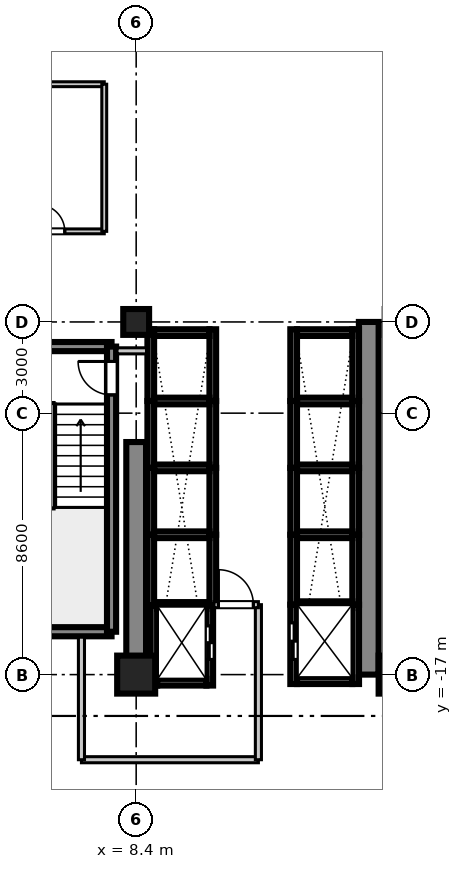
"""IFC4 building model, lengths in metres.
Left out: names, types, materials, properties, quantities, classifications, styles, units other than length and angle.
Written with IfcOpenShell. Run it as: python <this file> out.ifc"""

import sys

from ifc_helpers import new_model, si_unit, direction, frame, frame_2d, origin, origin_2d, place, context, subcontext, project, spatial, rectangle, extrude, source, transform, mapped, element, fill, save


model = new_model("IFC4")
c1 = context("Model", 3, precision=1e-05, world=origin(), true_north=direction((0.0, 1.0)))
c2 = subcontext(c1, "Body", "Model", "MODEL_VIEW")
j1 = project(units=[si_unit("LENGTHUNIT", "METRE"), si_unit("PLANEANGLEUNIT", "RADIAN")], contexts=[c1])
p1 = place(None, origin())
s1 = spatial("IfcSite", under=j1, at=p1, CompositionType="ELEMENT")
p2 = place(p1, origin())
s2 = spatial("IfcBuilding", under=s1, at=p2, CompositionType="ELEMENT")
p3 = place(p2, frame((0.0, 0.0, 132.1)))
s3 = spatial("IfcBuildingStorey", under=s2, at=p3, CompositionType="ELEMENT", Elevation=132.1)
m1 = source(origin(), c2, "Body", "SweptSolid", [
    extrude(rectangle(XDim=1.25, YDim=1.25, at=origin_2d()), origin(), (0.0, 0.0, 1.0), 3.605),
])
p4 = place(p3, frame((8.4, -17.0, 0.0), z_axis=(0.0, 0.0, 1.0), x_axis=(1.0, 0.0, 0.0)))
e1 = element("IfcColumn", 1, at=p4, inside=s3, PredefinedType="COLUMN", context=c2, shape_type="MappedRepresentation", body=[
    mapped(m1, transform((0.0, 0.0, 0.0), scale=1.0)),
])
m2 = source(origin(), c2, "Body", "SweptSolid", [
    extrude(rectangle(XDim=0.85, YDim=0.85, at=origin_2d()), origin(), (0.0, 0.0, 1.0), 3.605),
])
p5 = place(p3, frame((8.4, -5.4, 0.0), z_axis=(0.0, 0.0, 1.0), x_axis=(1.0, 0.0, 0.0)))
e2 = element("IfcColumn", 2, at=p5, inside=s3, PredefinedType="PILASTER", context=c2, shape_type="MappedRepresentation", body=[
    mapped(m2, transform((0.0, 0.0, 0.0), scale=1.0)),
])
p6 = place(p3, frame((17.0, -17.0, 0.0), z_axis=(0.0, 0.0, 1.0), x_axis=(1.0, 0.0, 0.0)))
e3 = element("IfcColumn", 3, at=p6, inside=s3, PredefinedType="COLUMN", context=c2, shape_type="MappedRepresentation", body=[
    mapped(m1, transform((0.0, 0.0, 0.0), scale=1.0)),
])
m3 = source(origin(), c2, "Body", "SweptSolid", [
    extrude(rectangle(XDim=7.65, YDim=0.65, at=frame_2d((3.825, 0.0))), origin(), (0.0, 0.0, 1.0), 3.38),
])
p7 = place(p3, frame((8.4, -17.0, 0.0), z_axis=(0.0, 0.0, 1.0), x_axis=(0.0, 1.0, 0.0)))
e4 = element("IfcWall", 4, at=p7, inside=s3, PredefinedType="SHEAR", context=c2, shape_type="MappedRepresentation", body=[
    mapped(m3, transform((0.0, 0.0, 0.0), scale=1.0)),
])
m4 = source(origin(), c2, "Body", "SweptSolid", [
    extrude(rectangle(XDim=11.6, YDim=0.65, at=frame_2d((5.8, 0.0))), origin(), (0.0, 0.0, 1.0), 3.38),
])
p8 = place(p3, frame((16.05, -17.0, 0.0), z_axis=(0.0, 0.0, 1.0), x_axis=(0.0, 1.0, 0.0)))
e5 = element("IfcWall", 5, at=p8, inside=s3, PredefinedType="SHEAR", context=c2, shape_type="MappedRepresentation", body=[
    mapped(m4, transform((0.0, 0.0, 0.0), scale=1.0)),
])
m5 = source(origin(), c2, "Body", "SweptSolid", [
    extrude(rectangle(XDim=3.98, YDim=0.3, at=frame_2d((1.99, 0.0))), origin(), (0.0, 0.0, 1.0), 3.38),
])
for number, where, z_axis, x_axis in (
    (6, (3.61, -15.59, 0.0), (0.0, 0.0, 1.0), (1.0, 0.0, 0.0)),
    (7, (3.61, -6.21, 0.0), (0.0, 0.0, 1.0), (1.0, 0.0, 0.0)),
):
    element("IfcWall", number, at=place(p3, frame(where, z_axis=z_axis, x_axis=x_axis)), inside=s3, PredefinedType="SHEAR", context=c2, shape_type="MappedRepresentation", body=[
        mapped(m5, transform((0.0, 0.0, 0.0), scale=1.0)),
    ])
m6 = source(origin(), c2, "Body", "SweptSolid", [
    extrude(rectangle(XDim=9.38, YDim=0.3, at=frame_2d((4.69, 0.0))), origin(), (0.0, 0.0, 1.0), 3.38),
])
p9 = place(p3, frame((7.59, -15.59, 0.0), z_axis=(0.0, 0.0, 1.0), x_axis=(0.0, 1.0, 0.0)))
e8 = element("IfcWall", 8, at=p9, inside=s3, PredefinedType="SHEAR", context=c2, shape_type="MappedRepresentation", body=[
    mapped(m6, transform((0.0, 0.0, 0.0), scale=1.0)),
])
p10 = place(p9, frame((7.79, 0.0, 0.0)))
e9 = element("IfcOpeningElement", 9, at=p10, cuts=e8, PredefinedType="OPENING", context=c2, shape_type="SweptSolid", body=[
    extrude(rectangle(XDim=1.1, YDim=2.15, at=frame_2d((0.55, 1.075))), frame((0.0, 0.16, 0.0), z_axis=(0.0, -1.0, 0.0), x_axis=(1.0, 0.0, 0.0)), (0.0, 0.0, 1.0), 0.32),
])
m7 = source(origin(), c2, "Body", "SweptSolid", [
    extrude(rectangle(XDim=2.36, YDim=0.22, at=frame_2d((1.18, 0.0))), origin(), (0.0, 0.0, 1.0), 3.38),
])
for number, where, z_axis, x_axis in (
    (10, (13.58, -8.0, 0.0), (0.0, 0.0, 1.0), (0.0, 1.0, 0.0)),
    (11, (15.62, -8.0, 0.0), (0.0, 0.0, 1.0), (0.0, 1.0, 0.0)),
):
    element("IfcWall", number, at=place(p3, frame(where, z_axis=z_axis, x_axis=x_axis)), inside=s3, PredefinedType="SHEAR", context=c2, shape_type="MappedRepresentation", body=[
        mapped(m7, transform((0.0, 0.0, 0.0), scale=1.0)),
    ])
m8 = source(origin(), c2, "Body", "SweptSolid", [
    extrude(rectangle(XDim=1.82, YDim=0.22, at=frame_2d((0.91, 0.0))), origin(), (0.0, 0.0, 1.0), 3.38),
])
p11 = place(p3, frame((13.69, -5.75, 0.0), z_axis=(0.0, 0.0, 1.0), x_axis=(1.0, 0.0, 0.0)))
e12 = element("IfcWall", 12, at=p11, inside=s3, PredefinedType="SHEAR", context=c2, shape_type="MappedRepresentation", body=[
    mapped(m8, transform((0.0, 0.0, 0.0), scale=1.0)),
])
m9 = source(origin(), c2, "Body", "SweptSolid", [
    extrude(rectangle(XDim=2.2, YDim=0.22, at=frame_2d((1.1, 0.0))), origin(), (0.0, 0.0, 1.0), 3.38),
])
for number, where, z_axis, x_axis in (
    (13, (13.58, -10.2, 0.0), (0.0, 0.0, 1.0), (0.0, 1.0, 0.0)),
    (14, (15.62, -10.2, 0.0), (0.0, 0.0, 1.0), (0.0, 1.0, 0.0)),
):
    element("IfcWall", number, at=place(p3, frame(where, z_axis=z_axis, x_axis=x_axis)), inside=s3, PredefinedType="SHEAR", context=c2, shape_type="MappedRepresentation", body=[
        mapped(m9, transform((0.0, 0.0, 0.0), scale=1.0)),
    ])
m10 = source(origin(), c2, "Body", "SweptSolid", [
    extrude(rectangle(XDim=1.82, YDim=0.22, at=frame_2d((0.91, 0.0))), origin(), (0.0, 0.0, 1.0), 3.65),
])
p12 = place(p3, frame((13.69, -8.0, 0.0), z_axis=(0.0, 0.0, 1.0), x_axis=(1.0, 0.0, 0.0)))
e15 = element("IfcWall", 15, at=p12, inside=s3, PredefinedType="SHEAR", context=c2, shape_type="MappedRepresentation", body=[
    mapped(m10, transform((0.0, 0.0, 0.0), scale=1.0)),
])
for number, where, z_axis, x_axis in (
    (16, (13.58, -12.4, 0.0), (0.0, 0.0, 1.0), (0.0, 1.0, 0.0)),
    (17, (15.62, -12.4, 0.0), (0.0, 0.0, 1.0), (0.0, 1.0, 0.0)),
):
    element("IfcWall", number, at=place(p3, frame(where, z_axis=z_axis, x_axis=x_axis)), inside=s3, PredefinedType="SHEAR", context=c2, shape_type="MappedRepresentation", body=[
        mapped(m9, transform((0.0, 0.0, 0.0), scale=1.0)),
    ])
p13 = place(p3, frame((13.69, -10.2, 0.0), z_axis=(0.0, 0.0, 1.0), x_axis=(1.0, 0.0, 0.0)))
e18 = element("IfcWall", 18, at=p13, inside=s3, PredefinedType="SHEAR", context=c2, shape_type="MappedRepresentation", body=[
    mapped(m10, transform((0.0, 0.0, 0.0), scale=1.0)),
])
m11 = source(origin(), c2, "Body", "SweptSolid", [
    extrude(rectangle(XDim=2.3, YDim=0.22, at=frame_2d((1.15, 0.0))), origin(), (0.0, 0.0, 1.0), 3.38),
])
for number, where, z_axis, x_axis in (
    (19, (13.58, -14.7, 0.0), (0.0, 0.0, 1.0), (0.0, 1.0, 0.0)),
    (20, (15.62, -14.7, 0.0), (0.0, 0.0, 1.0), (0.0, 1.0, 0.0)),
):
    element("IfcWall", number, at=place(p3, frame(where, z_axis=z_axis, x_axis=x_axis)), inside=s3, PredefinedType="SHEAR", context=c2, shape_type="MappedRepresentation", body=[
        mapped(m11, transform((0.0, 0.0, 0.0), scale=1.0)),
    ])
p14 = place(p3, frame((13.69, -12.4, 0.0), z_axis=(0.0, 0.0, 1.0), x_axis=(1.0, 0.0, 0.0)))
e21 = element("IfcWall", 21, at=p14, inside=s3, PredefinedType="SHEAR", context=c2, shape_type="MappedRepresentation", body=[
    mapped(m10, transform((0.0, 0.0, 0.0), scale=1.0)),
])
for number, where, z_axis, x_axis in (
    (22, (8.88, -8.0, 0.0), (0.0, 0.0, 1.0), (0.0, 1.0, 0.0)),
    (23, (10.92, -8.0, 0.0), (0.0, 0.0, 1.0), (0.0, 1.0, 0.0)),
):
    element("IfcWall", number, at=place(p3, frame(where, z_axis=z_axis, x_axis=x_axis)), inside=s3, PredefinedType="SHEAR", context=c2, shape_type="MappedRepresentation", body=[
        mapped(m7, transform((0.0, 0.0, 0.0), scale=1.0)),
    ])
p15 = place(p3, frame((8.99, -5.75, 0.0), z_axis=(0.0, 0.0, 1.0), x_axis=(1.0, 0.0, 0.0)))
e24 = element("IfcWall", 24, at=p15, inside=s3, PredefinedType="SHEAR", context=c2, shape_type="MappedRepresentation", body=[
    mapped(m8, transform((0.0, 0.0, 0.0), scale=1.0)),
])
for number, where, z_axis, x_axis in (
    (25, (8.88, -10.2, 0.0), (0.0, 0.0, 1.0), (0.0, 1.0, 0.0)),
    (26, (10.92, -10.2, 0.0), (0.0, 0.0, 1.0), (0.0, 1.0, 0.0)),
):
    element("IfcWall", number, at=place(p3, frame(where, z_axis=z_axis, x_axis=x_axis)), inside=s3, PredefinedType="SHEAR", context=c2, shape_type="MappedRepresentation", body=[
        mapped(m9, transform((0.0, 0.0, 0.0), scale=1.0)),
    ])
p16 = place(p3, frame((8.99, -8.0, 0.0), z_axis=(0.0, 0.0, 1.0), x_axis=(1.0, 0.0, 0.0)))
e27 = element("IfcWall", 27, at=p16, inside=s3, PredefinedType="SHEAR", context=c2, shape_type="MappedRepresentation", body=[
    mapped(m10, transform((0.0, 0.0, 0.0), scale=1.0)),
])
for number, where, z_axis, x_axis in (
    (28, (8.88, -12.4, 0.0), (0.0, 0.0, 1.0), (0.0, 1.0, 0.0)),
    (29, (10.92, -12.4, 0.0), (0.0, 0.0, 1.0), (0.0, 1.0, 0.0)),
):
    element("IfcWall", number, at=place(p3, frame(where, z_axis=z_axis, x_axis=x_axis)), inside=s3, PredefinedType="SHEAR", context=c2, shape_type="MappedRepresentation", body=[
        mapped(m9, transform((0.0, 0.0, 0.0), scale=1.0)),
    ])
p17 = place(p3, frame((8.99, -10.2, 0.0), z_axis=(0.0, 0.0, 1.0), x_axis=(1.0, 0.0, 0.0)))
e30 = element("IfcWall", 30, at=p17, inside=s3, PredefinedType="SHEAR", context=c2, shape_type="MappedRepresentation", body=[
    mapped(m10, transform((0.0, 0.0, 0.0), scale=1.0)),
])
m12 = source(origin(), c2, "Body", "SweptSolid", [
    extrude(rectangle(XDim=2.325, YDim=0.22, at=frame_2d((1.163, 0.0))), origin(), (0.0, 0.0, 1.0), 3.38),
])
for number, where, z_axis, x_axis in (
    (31, (8.88, -14.725, 0.0), (0.0, 0.0, 1.0), (0.0, 1.0, 0.0)),
    (32, (10.92, -14.725, 0.0), (0.0, 0.0, 1.0), (0.0, 1.0, 0.0)),
):
    element("IfcWall", number, at=place(p3, frame(where, z_axis=z_axis, x_axis=x_axis)), inside=s3, PredefinedType="SHEAR", context=c2, shape_type="MappedRepresentation", body=[
        mapped(m12, transform((0.0, 0.0, 0.0), scale=1.0)),
    ])
p18 = place(p3, frame((8.99, -12.4, 0.0), z_axis=(0.0, 0.0, 1.0), x_axis=(1.0, 0.0, 0.0)))
e33 = element("IfcWall", 33, at=p18, inside=s3, PredefinedType="SHEAR", context=c2, shape_type="MappedRepresentation", body=[
    mapped(m10, transform((0.0, 0.0, 0.0), scale=1.0)),
])
m13 = source(origin(), c2, "Body", "SweptSolid", [
    extrude(rectangle(XDim=2.635, YDim=0.22, at=frame_2d((1.317, 0.0))), origin(), (0.0, 0.0, 1.0), 3.38),
])
p19 = place(p3, frame((8.98, -17.36, 0.0), z_axis=(0.0, 0.0, 1.0), x_axis=(0.0, 1.0, 0.0)))
e34 = element("IfcWall", 34, at=p19, inside=s3, PredefinedType="SHEAR", context=c2, shape_type="MappedRepresentation", body=[
    mapped(m13, transform((0.0, 0.0, 0.0), scale=1.0)),
])
p20 = place(p3, frame((10.82, -17.36, 0.0), z_axis=(0.0, 0.0, 1.0), x_axis=(0.0, 1.0, 0.0)))
e35 = element("IfcWall", 35, at=p20, inside=s3, PredefinedType="SHEAR", context=c2, shape_type="MappedRepresentation", body=[
    mapped(m13, transform((0.0, 0.0, 0.0), scale=1.0)),
])
p21 = place(p20, frame((0.86, 0.0, 0.0)))
e36 = element("IfcOpeningElement", 36, at=p21, cuts=e35, PredefinedType="OPENING", context=c2, shape_type="SweptSolid", body=[
    extrude(rectangle(XDim=1.1, YDim=2.2, at=frame_2d((0.55, 1.1))), frame((0.0, 0.12, 0.0), z_axis=(0.0, -1.0, 0.0), x_axis=(1.0, 0.0, 0.0)), (0.0, 0.0, 1.0), 0.24),
])
m14 = source(origin(), c2, "Body", "SweptSolid", [
    extrude(rectangle(XDim=1.62, YDim=0.22, at=frame_2d((0.81, 0.0))), origin(), (0.0, 0.0, 1.0), 3.38),
])
p22 = place(p3, frame((9.09, -17.25, 0.0), z_axis=(0.0, 0.0, 1.0), x_axis=(1.0, 0.0, 0.0)))
e37 = element("IfcWall", 37, at=p22, inside=s3, PredefinedType="SHEAR", context=c2, shape_type="MappedRepresentation", body=[
    mapped(m14, transform((0.0, 0.0, 0.0), scale=1.0)),
])
m15 = source(origin(), c2, "Body", "SweptSolid", [
    extrude(rectangle(XDim=1.62, YDim=0.22, at=frame_2d((0.81, 0.0))), origin(), (0.0, 0.0, 1.0), 3.65),
])
p23 = place(p3, frame((9.09, -14.725, 0.0), z_axis=(0.0, 0.0, 1.0), x_axis=(1.0, 0.0, 0.0)))
e38 = element("IfcWall", 38, at=p23, inside=s3, PredefinedType="SHEAR", context=c2, shape_type="MappedRepresentation", body=[
    mapped(m15, transform((0.0, 0.0, 0.0), scale=1.0)),
])
m16 = source(origin(), c2, "Body", "SweptSolid", [
    extrude(rectangle(XDim=2.61, YDim=0.22, at=frame_2d((1.305, 0.0))), origin(), (0.0, 0.0, 1.0), 3.38),
])
p24 = place(p3, frame((13.58, -17.31, 0.0), z_axis=(0.0, 0.0, 1.0), x_axis=(0.0, 1.0, 0.0)))
e39 = element("IfcWall", 39, at=p24, inside=s3, PredefinedType="SHEAR", context=c2, shape_type="MappedRepresentation", body=[
    mapped(m16, transform((0.0, 0.0, 0.0), scale=1.0)),
])
p25 = place(p24, frame((0.81, 0.0, 0.0)))
e40 = element("IfcOpeningElement", 40, at=p25, cuts=e39, PredefinedType="OPENING", context=c2, shape_type="SweptSolid", body=[
    extrude(rectangle(XDim=1.2, YDim=2.2, at=frame_2d((0.6, 1.1))), frame((0.0, 0.12, 0.0), z_axis=(0.0, -1.0, 0.0), x_axis=(1.0, 0.0, 0.0)), (0.0, 0.0, 1.0), 0.24),
])
p26 = place(p3, frame((15.62, -17.31, 0.0), z_axis=(0.0, 0.0, 1.0), x_axis=(0.0, 1.0, 0.0)))
e41 = element("IfcWall", 41, at=p26, inside=s3, PredefinedType="SHEAR", context=c2, shape_type="MappedRepresentation", body=[
    mapped(m16, transform((0.0, 0.0, 0.0), scale=1.0)),
])
p27 = place(p3, frame((13.69, -17.2, 0.0), z_axis=(0.0, 0.0, 1.0), x_axis=(1.0, 0.0, 0.0)))
e42 = element("IfcWall", 42, at=p27, inside=s3, PredefinedType="SHEAR", context=c2, shape_type="MappedRepresentation", body=[
    mapped(m8, transform((0.0, 0.0, 0.0), scale=1.0)),
])
p28 = place(p3, frame((13.69, -14.7, 0.0), z_axis=(0.0, 0.0, 1.0), x_axis=(1.0, 0.0, 0.0)))
e43 = element("IfcWall", 43, at=p28, inside=s3, PredefinedType="SHEAR", context=c2, shape_type="MappedRepresentation", body=[
    mapped(m10, transform((0.0, 0.0, 0.0), scale=1.0)),
])
m17 = source(origin(), c2, "Body", "SweptSolid", [
    extrude(rectangle(XDim=5.82, YDim=0.2, at=frame_2d((2.91, 0.0))), origin(), (0.0, 0.0, 1.0), 2.72),
])
p29 = place(p3, frame((6.6, -19.8, 0.0), z_axis=(0.0, 0.0, 1.0), x_axis=(1.0, 0.0, 0.0)))
e44 = element("IfcWall", 44, at=p29, inside=s3, PredefinedType="PARTITIONING", context=c2, shape_type="MappedRepresentation", body=[
    mapped(m17, transform((0.0, 0.0, 0.0), scale=1.0)),
])
m18 = source(origin(), c2, "Body", "SweptSolid", [
    extrude(rectangle(XDim=4.03, YDim=0.2, at=frame_2d((2.015, 0.0))), origin(), (0.0, 0.0, 1.0), 2.72),
])
p30 = place(p3, frame((6.6, -19.8, 0.0), z_axis=(0.0, 0.0, 1.0), x_axis=(0.0, 1.0, 0.0)))
e45 = element("IfcWall", 45, at=p30, inside=s3, PredefinedType="PARTITIONING", context=c2, shape_type="MappedRepresentation", body=[
    mapped(m18, transform((0.0, 0.0, 0.0), scale=1.0)),
])
m19 = source(origin(), c2, "Body", "SweptSolid", [
    extrude(rectangle(XDim=5.1, YDim=0.2, at=frame_2d((2.55, 0.0))), origin(), (0.0, 0.0, 1.0), 2.72),
])
p31 = place(p3, frame((12.42, -19.8, 0.0), z_axis=(0.0, 0.0, 1.0), x_axis=(0.0, 1.0, 0.0)))
e46 = element("IfcWall", 46, at=p31, inside=s3, PredefinedType="PARTITIONING", context=c2, shape_type="MappedRepresentation", body=[
    mapped(m19, transform((0.0, 0.0, 0.0), scale=1.0)),
])
m20 = source(origin(), c2, "Body", "SweptSolid", [
    extrude(rectangle(XDim=1.46, YDim=0.2, at=frame_2d((0.73, 0.0))), origin(), (0.0, 0.0, 1.0), 2.72),
])
p32 = place(p3, frame((10.96, -14.7, 0.0), z_axis=(0.0, 0.0, 1.0), x_axis=(1.0, 0.0, 0.0)))
e47 = element("IfcWall", 47, at=p32, inside=s3, PredefinedType="PARTITIONING", context=c2, shape_type="MappedRepresentation", body=[
    mapped(m20, transform((0.0, 0.0, 0.0), scale=1.0)),
])
p33 = place(p32, frame((0.145, 0.0, 0.0)))
e48 = element("IfcOpeningElement", 48, at=p33, cuts=e47, PredefinedType="OPENING", context=c2, shape_type="SweptSolid", body=[
    extrude(rectangle(XDim=1.15, YDim=2.15, at=frame_2d((0.575, 1.075))), frame((0.0, 0.11, 0.0), z_axis=(0.0, -1.0, 0.0), x_axis=(1.0, 0.0, 0.0)), (0.0, 0.0, 1.0), 0.22),
])
m21 = source(origin(), c2, "Body", "SweptSolid", [
    extrude(rectangle(XDim=0.97, YDim=0.2, at=frame_2d((0.485, 0.0))), origin(), (0.0, 0.0, 1.0), 2.72),
])
p34 = place(p3, frame((7.77, -6.35, 0.0), z_axis=(0.0, 0.0, 1.0), x_axis=(1.0, 0.0, 0.0)))
e49 = element("IfcWall", 49, at=p34, inside=s3, PredefinedType="PARTITIONING", context=c2, shape_type="MappedRepresentation", body=[
    mapped(m21, transform((0.0, 0.0, 0.0), scale=1.0)),
])
m22 = source(origin(), c2, "Body", "SweptSolid", [
    extrude(rectangle(XDim=4.8, YDim=0.16, at=frame_2d((2.4, 0.0))), origin(), (0.0, 0.0, 1.0), 2.72),
])
p35 = place(p3, frame((2.55, -2.42, 0.0), z_axis=(0.0, 0.0, 1.0), x_axis=(1.0, 0.0, 0.0)))
e50 = element("IfcWall", 50, at=p35, inside=s3, PredefinedType="PARTITIONING", context=c2, shape_type="MappedRepresentation", body=[
    mapped(m22, transform((0.0, 0.0, 0.0), scale=1.0)),
])
p36 = place(p35, frame((2.621, 0.0, 0.0)))
e51 = element("IfcOpeningElement", 51, at=p36, cuts=e50, PredefinedType="OPENING", context=c2, shape_type="SweptSolid", body=[
    extrude(rectangle(XDim=0.88, YDim=2.1, at=frame_2d((0.44, 1.05))), frame((0.0, 0.09, 0.0), z_axis=(0.0, -1.0, 0.0), x_axis=(1.0, 0.0, 0.0)), (0.0, 0.0, 1.0), 0.18),
])
p37 = place(p3, frame((2.55, 2.42, 0.0), z_axis=(0.0, 0.0, 1.0), x_axis=(1.0, 0.0, 0.0)))
e52 = element("IfcWall", 52, at=p37, inside=s3, PredefinedType="PARTITIONING", context=c2, shape_type="MappedRepresentation", body=[
    mapped(m22, transform((0.0, 0.0, 0.0), scale=1.0)),
])
m23 = source(origin(), c2, "Body", "SweptSolid", [
    extrude(rectangle(XDim=4.84, YDim=0.16, at=frame_2d((2.42, 0.0))), origin(), (0.0, 0.0, 1.0), 2.72),
])
p38 = place(p3, frame((7.35, -2.42, 0.0), z_axis=(0.0, 0.0, 1.0), x_axis=(0.0, 1.0, 0.0)))
e53 = element("IfcWall", 53, at=p38, inside=s3, PredefinedType="PARTITIONING", context=c2, shape_type="MappedRepresentation", body=[
    mapped(m23, transform((0.0, 0.0, 0.0), scale=1.0)),
])
m24 = source(origin(), c2, "Body", "SweptSolid", [
    extrude(rectangle(XDim=1.1, YDim=2.15, at=frame_2d((0.55, 1.075))), frame((0.0, 0.025, 0.0), z_axis=(0.0, -1.0, 0.0), x_axis=(1.0, 0.0, 0.0)), (0.0, 0.0, 1.0), 0.05),
])
p39 = place(p10, origin())
e54 = element("IfcDoor", 54, at=p39, inside=s3, OperationType="SINGLE_SWING_RIGHT", PredefinedType="DOOR", context=c2, shape_type="MappedRepresentation", body=[
    mapped(m24, transform((0.0, 0.0, 0.0), scale=1.0)),
])
fill(e9, e54)
m25 = source(origin(), c2, "Body", "SweptSolid", [
    extrude(rectangle(XDim=1.1, YDim=2.2, at=frame_2d((0.55, 1.1))), frame((0.0, 0.025, 0.0), z_axis=(0.0, -1.0, 0.0), x_axis=(1.0, 0.0, 0.0)), (0.0, 0.0, 1.0), 0.05),
])
p40 = place(p21, frame((1.1, 0.0, 0.0), z_axis=(0.0, 0.0, 1.0), x_axis=(-1.0, 0.0, 0.0)))
e55 = element("IfcDoor", 55, at=p40, inside=s3, OperationType="DOUBLE_DOOR_SLIDING", PredefinedType="DOOR", context=c2, shape_type="MappedRepresentation", body=[
    mapped(m25, transform((0.0, 0.0, 0.0), scale=1.0)),
])
fill(e36, e55)
m26 = source(origin(), c2, "Body", "SweptSolid", [
    extrude(rectangle(XDim=1.2, YDim=2.2, at=frame_2d((0.6, 1.1))), frame((0.0, 0.025, 0.0), z_axis=(0.0, -1.0, 0.0), x_axis=(1.0, 0.0, 0.0)), (0.0, 0.0, 1.0), 0.05),
])
p41 = place(p25, origin())
e56 = element("IfcDoor", 56, at=p41, inside=s3, OperationType="DOUBLE_DOOR_SLIDING", PredefinedType="DOOR", context=c2, shape_type="MappedRepresentation", body=[
    mapped(m26, transform((0.0, 0.0, 0.0), scale=1.0)),
])
fill(e40, e56)
m27 = source(origin(), c2, "Body", "SweptSolid", [
    extrude(rectangle(XDim=1.15, YDim=2.15, at=frame_2d((0.575, 1.075))), frame((0.0, 0.025, 0.0), z_axis=(0.0, -1.0, 0.0), x_axis=(1.0, 0.0, 0.0)), (0.0, 0.0, 1.0), 0.05),
])
p42 = place(p33, origin())
e57 = element("IfcDoor", 57, at=p42, inside=s3, OperationType="SINGLE_SWING_LEFT", PredefinedType="DOOR", context=c2, shape_type="MappedRepresentation", body=[
    mapped(m27, transform((0.0, 0.0, 0.0), scale=1.0)),
])
fill(e48, e57)
m28 = source(origin(), c2, "Body", "SweptSolid", [
    extrude(rectangle(XDim=0.88, YDim=2.1, at=frame_2d((0.44, 1.05))), frame((0.0, 0.025, 0.0), z_axis=(0.0, -1.0, 0.0), x_axis=(1.0, 0.0, 0.0)), (0.0, 0.0, 1.0), 0.05),
])
p43 = place(p36, origin())
e58 = element("IfcDoor", 58, at=p43, inside=s3, OperationType="SINGLE_SWING_LEFT", PredefinedType="DOOR", context=c2, shape_type="MappedRepresentation", body=[
    mapped(m28, transform((0.0, 0.0, 0.0), scale=1.0)),
])
fill(e51, e58)
save(model, sys.argv[1])
